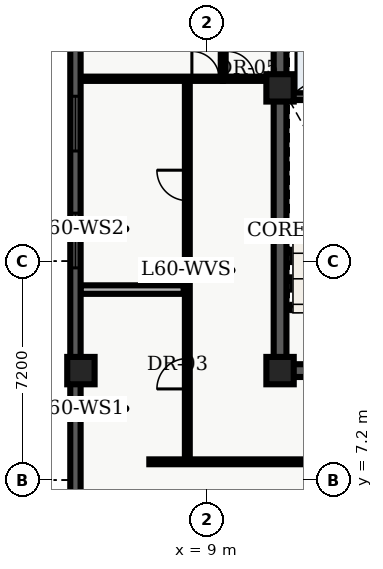
"""IFC4 building model, lengths in metres.
Left out: names, types, materials, properties, quantities, classifications, styles, units other than length and angle.
Written with IfcOpenShell. Run it as: python <this file> out.ifc"""

import sys

from ifc_helpers import new_model, entity, si_unit, converted_unit, direction, frame, origin_with_axes, origin_2d_with_axis, place, context, subcontext, project, spatial, polyline, rectangle, outline, extrude, element, fill, save


model = new_model("IFC4")
c1 = context("Model", 3, precision=1e-05, world=origin_with_axes(), true_north=direction((0.0, 1.0)))
c2 = subcontext(c1, "Body", "Model", "MODEL_VIEW")
j1 = project(units=[si_unit("LENGTHUNIT", "METRE"), converted_unit("PLANEANGLEUNIT", "DEGREE", entity("IfcPlaneAngleMeasure", 0.017), si_unit("PLANEANGLEUNIT", "RADIAN"), dimensions=[0, 0, 0, 0, 0, 0, 0])], contexts=[c1])
p1 = place(None, origin_with_axes())
s1 = spatial("IfcSite", under=j1, at=p1, CompositionType="ELEMENT")
p2 = place(p1, origin_with_axes())
s2 = spatial("IfcBuilding", under=s1, at=p2, CompositionType="ELEMENT")
p3 = place(p2, frame((0.0, 0.0, 244.2), z_axis=(0.0, 0.0, 1.0), x_axis=(1.0, 0.0, 0.0)))
s3 = spatial("IfcBuildingStorey", under=s2, at=p3, CompositionType="ELEMENT", Elevation=244.2)
p4 = place(p3, frame((11.4, 10.8, 0.0), z_axis=(0.0, 0.0, 1.0), x_axis=(0.0, 1.0, 0.0)))
e1 = element("IfcWall", 1, at=p4, inside=s3, PredefinedType="SHEAR", context=c2, shape_type="SweptSolid", body=[
    extrude(outline(polyline([(0.0, -0.21), (27.0, -0.21), (27.0, 0.21), (0.0, 0.21), (0.0, -0.21)])), origin_with_axes(), (0.0, 0.0, 1.0), 3.6),
])
p5 = place(p3, frame((11.4, 10.8, 0.0), z_axis=(0.0, 0.0, 1.0), x_axis=(1.0, 0.0, 0.0)))
e2 = element("IfcWall", 2, at=p5, inside=s3, PredefinedType="SHEAR", context=c2, shape_type="SweptSolid", body=[
    extrude(outline(polyline([(0.0, -0.21), (7.2, -0.21), (7.2, 0.21), (0.0, 0.21), (0.0, -0.21)])), origin_with_axes(), (0.0, 0.0, 1.0), 3.6),
])
p6 = place(p5, frame((2.625, 0.0, 0.0), z_axis=(0.0, 0.0, 1.0), x_axis=(1.0, 0.0, 0.0)))
e3 = element("IfcOpeningElement", 3, at=p6, cuts=e2, PredefinedType="OPENING", context=c2, shape_type="SweptSolid", body=[
    extrude(rectangle(XDim=1.05, YDim=0.44, at=origin_2d_with_axis()), origin_with_axes(), (0.0, 0.0, 1.0), 2.15),
])
p7 = place(p3, frame((11.61, 19.825, 0.0), z_axis=(0.0, 0.0, 1.0), x_axis=(1.0, 0.0, 0.0)))
e4 = element("IfcWall", 4, at=p7, inside=s3, PredefinedType="SHEAR", context=c2, shape_type="SweptSolid", body=[
    extrude(outline(polyline([(0.0, -0.125), (6.78, -0.125), (6.78, 0.125), (0.0, 0.125), (0.0, -0.125)])), origin_with_axes(), (0.0, 0.0, 1.0), 3.6),
])
for number, where, z_axis, x_axis in (
    (5, (11.4, 10.8, 0.0), (0.0, 0.0, 1.0), (1.0, 0.0, 0.0)),
    (6, (11.4, 20.1, 0.0), (0.0, 0.0, 1.0), (1.0, 0.0, 0.0)),
    (7, (4.85, 10.8, 0.0), (0.0, 0.0, 1.0), (1.0, 0.0, 0.0)),
):
    element("IfcColumn", number, at=place(p3, frame(where, z_axis=z_axis, x_axis=x_axis)), inside=s3, PredefinedType="COLUMN", context=c2, shape_type="SweptSolid", body=[
        extrude(rectangle(XDim=0.9, YDim=0.9, at=origin_2d_with_axis()), origin_with_axes(), (0.0, 0.0, 1.0), 3.9),
    ])
p8 = place(p3, frame((9.52, 20.4, 0.0), z_axis=(0.0, 0.0, 1.0), x_axis=(0.0, 1.0, 0.0)))
e8 = element("IfcWall", 8, at=p8, inside=s3, PredefinedType="PARTITIONING", context=c2, shape_type="SweptSolid", body=[
    extrude(outline(polyline([(0.0, -0.07), (4.0, -0.07), (4.0, 0.07), (0.0, 0.07), (0.0, -0.07)])), origin_with_axes(), (0.0, 0.0, 1.0), 2.64),
])
p9 = place(p3, frame((9.52, 20.4, 0.0), z_axis=(0.0, 0.0, 1.0), x_axis=(1.0, 0.0, 0.0)))
e9 = element("IfcWall", 9, at=p9, inside=s3, PredefinedType="PARTITIONING", context=c2, shape_type="SweptSolid", body=[
    extrude(outline(polyline([(0.0, -0.07), (1.58, -0.07), (1.58, 0.07), (0.0, 0.07), (0.0, -0.07)])), origin_with_axes(), (0.0, 0.0, 1.0), 2.64),
])
p10 = place(p9, frame((0.59, 0.0, 0.0), z_axis=(0.0, 0.0, 1.0), x_axis=(1.0, 0.0, 0.0)))
e10 = element("IfcOpeningElement", 10, at=p10, cuts=e9, PredefinedType="OPENING", context=c2, shape_type="SweptSolid", body=[
    extrude(rectangle(XDim=0.9, YDim=0.16, at=origin_2d_with_axis()), origin_with_axes(), (0.0, 0.0, 1.0), 2.15),
])
p11 = place(p3, frame((7.1, 7.8, 0.0), z_axis=(0.0, 0.0, 1.0), x_axis=(1.0, 0.0, 0.0)))
e11 = element("IfcWall", 11, at=p11, inside=s3, PredefinedType="PARTITIONING", context=c2, shape_type="SweptSolid", body=[
    extrude(outline(polyline([(0.0, -0.08), (13.2, -0.08), (13.2, 0.08), (0.0, 0.08), (0.0, -0.08)])), origin_with_axes(), (0.0, 0.0, 1.0), 2.64),
])
p12 = place(p11, frame((6.57, 0.0, 0.0), z_axis=(0.0, 0.0, 1.0), x_axis=(1.0, 0.0, 0.0)))
e12 = element("IfcOpeningElement", 12, at=p12, cuts=e11, PredefinedType="OPENING", context=c2, shape_type="SweptSolid", body=[
    extrude(rectangle(XDim=1.2, YDim=0.18, at=origin_2d_with_axis()), origin_with_axes(), (0.0, 0.0, 1.0), 2.2),
])
p13 = place(p3, frame((8.35, 7.8, 0.0), z_axis=(0.0, 0.0, 1.0), x_axis=(0.0, 1.0, 0.0)))
e13 = element("IfcWall", 13, at=p13, inside=s3, PredefinedType="PARTITIONING", context=c2, shape_type="SweptSolid", body=[
    extrude(outline(polyline([(0.0, -0.08), (12.6, -0.08), (12.6, 0.08), (0.0, 0.08), (0.0, -0.08)])), origin_with_axes(), (0.0, 0.0, 1.0), 2.64),
])
p14 = place(p13, frame((2.897, 0.0, 0.0), z_axis=(0.0, 0.0, 1.0), x_axis=(1.0, 0.0, 0.0)))
e14 = element("IfcOpeningElement", 14, at=p14, cuts=e13, PredefinedType="OPENING", context=c2, shape_type="SweptSolid", body=[
    extrude(rectangle(XDim=1.0, YDim=0.18, at=origin_2d_with_axis()), origin_with_axes(), (0.0, 0.0, 1.0), 2.15),
])
p15 = place(p13, frame((9.092, 0.0, 0.0), z_axis=(0.0, 0.0, 1.0), x_axis=(1.0, 0.0, 0.0)))
e15 = element("IfcOpeningElement", 15, at=p15, cuts=e13, PredefinedType="OPENING", context=c2, shape_type="SweptSolid", body=[
    extrude(rectangle(XDim=1.0, YDim=0.18, at=origin_2d_with_axis()), origin_with_axes(), (0.0, 0.0, 1.0), 2.15),
])
p16 = place(p3, frame((4.835, 20.4, 0.0), z_axis=(0.0, 0.0, 1.0), x_axis=(1.0, 0.0, 0.0)))
e16 = element("IfcWall", 16, at=p16, inside=s3, PredefinedType="PARTITIONING", context=c2, shape_type="SweptSolid", body=[
    extrude(outline(polyline([(0.0, -0.07), (4.685, -0.07), (4.685, 0.07), (0.0, 0.07), (0.0, -0.07)])), origin_with_axes(), (0.0, 0.0, 1.0), 2.64),
])
p17 = place(p16, frame((4.115, 0.0, 0.0), z_axis=(0.0, 0.0, 1.0), x_axis=(1.0, 0.0, 0.0)))
e17 = element("IfcOpeningElement", 17, at=p17, cuts=e16, PredefinedType="OPENING", context=c2, shape_type="SweptSolid", body=[
    extrude(rectangle(XDim=0.9, YDim=0.16, at=origin_2d_with_axis()), origin_with_axes(), (0.0, 0.0, 1.0), 2.15),
])
p18 = place(p3, frame((4.835, 13.465, 0.0), z_axis=(0.0, 0.0, 1.0), x_axis=(1.0, 0.0, 0.0)))
e18 = element("IfcWall", 18, at=p18, inside=s3, PredefinedType="PARTITIONING", context=c2, shape_type="SweptSolid", body=[
    extrude(outline(polyline([(0.0, -0.14), (3.395, -0.14), (3.395, 0.14), (0.0, 0.14), (0.0, -0.14)])), origin_with_axes(), (0.0, 0.0, 1.0), 2.64),
])
p19 = place(p3, frame((4.67, 2.74, 0.0), z_axis=(0.0, 0.0, 1.0), x_axis=(0.0, 1.0, 0.0)))
e19 = element("IfcWall", 19, at=p19, inside=s3, PredefinedType="SOLIDWALL", context=c2, shape_type="SweptSolid", body=[
    extrude(outline(polyline([(0.0, -0.17), (43.46, -0.17), (43.46, 0.17), (0.0, 0.17), (0.0, -0.17)])), origin_with_axes(), (0.0, 0.0, 1.0), 3.6),
])
p20 = place(p19, frame((2.948, 0.0, 0.45), z_axis=(0.0, 0.0, 1.0), x_axis=(1.0, 0.0, 0.0)))
e20 = element("IfcOpeningElement", 20, at=p20, cuts=e19, PredefinedType="OPENING", context=c2, shape_type="SweptSolid", body=[
    extrude(rectangle(XDim=1.8, YDim=0.36, at=origin_2d_with_axis()), origin_with_axes(), (0.0, 0.0, 1.0), 2.1),
])
p21 = place(p19, frame((12.339, 0.0, 0.45), z_axis=(0.0, 0.0, 1.0), x_axis=(1.0, 0.0, 0.0)))
e21 = element("IfcOpeningElement", 21, at=p21, cuts=e19, PredefinedType="OPENING", context=c2, shape_type="SweptSolid", body=[
    extrude(rectangle(XDim=1.8, YDim=0.36, at=origin_2d_with_axis()), origin_with_axes(), (0.0, 0.0, 1.0), 2.1),
])
p22 = place(p19, frame((16.184, 0.0, 0.45), z_axis=(0.0, 0.0, 1.0), x_axis=(1.0, 0.0, 0.0)))
e22 = element("IfcOpeningElement", 22, at=p22, cuts=e19, PredefinedType="OPENING", context=c2, shape_type="SweptSolid", body=[
    extrude(rectangle(XDim=1.8, YDim=0.36, at=origin_2d_with_axis()), origin_with_axes(), (0.0, 0.0, 1.0), 2.1),
])
p23 = place(p19, frame((40.062, 0.0, 0.45), z_axis=(0.0, 0.0, 1.0), x_axis=(1.0, 0.0, 0.0)))
e23 = element("IfcOpeningElement", 23, at=p23, cuts=e19, PredefinedType="OPENING", context=c2, shape_type="SweptSolid", body=[
    extrude(rectangle(XDim=1.8, YDim=0.36, at=origin_2d_with_axis()), origin_with_axes(), (0.0, 0.0, 1.0), 2.1),
])
p24 = place(p9, frame((0.59, 0.0, 0.0), z_axis=(0.0, 0.0, 1.0), x_axis=(1.0, 0.0, 0.0)))
e24 = element("IfcDoor", 24, at=p24, inside=s3, OperationType="SINGLE_SWING_LEFT", PredefinedType="DOOR", context=c2, shape_type="SweptSolid", body=[
    extrude(rectangle(XDim=0.9, YDim=0.084, at=origin_2d_with_axis()), origin_with_axes(), (0.0, 0.0, 1.0), 2.15),
])
fill(e10, e24)
p25 = place(p16, frame((4.115, 0.0, 0.0), z_axis=(0.0, 0.0, 1.0), x_axis=(1.0, 0.0, 0.0)))
e25 = element("IfcDoor", 25, at=p25, inside=s3, OperationType="SINGLE_SWING_LEFT", PredefinedType="DOOR", context=c2, shape_type="SweptSolid", body=[
    extrude(rectangle(XDim=0.9, YDim=0.084, at=origin_2d_with_axis()), origin_with_axes(), (0.0, 0.0, 1.0), 2.15),
])
fill(e17, e25)
p26 = place(p13, frame((2.897, 0.0, 0.0), z_axis=(0.0, 0.0, 1.0), x_axis=(1.0, 0.0, 0.0)))
e26 = element("IfcDoor", 26, at=p26, inside=s3, OperationType="SINGLE_SWING_LEFT", PredefinedType="DOOR", context=c2, shape_type="SweptSolid", body=[
    extrude(rectangle(XDim=1.0, YDim=0.09, at=origin_2d_with_axis()), origin_with_axes(), (0.0, 0.0, 1.0), 2.15),
])
fill(e14, e26)
p27 = place(p13, frame((9.092, 0.0, 0.0), z_axis=(0.0, 0.0, 1.0), x_axis=(1.0, 0.0, 0.0)))
e27 = element("IfcDoor", 27, at=p27, inside=s3, OperationType="SINGLE_SWING_RIGHT", PredefinedType="DOOR", context=c2, shape_type="SweptSolid", body=[
    extrude(rectangle(XDim=1.0, YDim=0.09, at=origin_2d_with_axis()), origin_with_axes(), (0.0, 0.0, 1.0), 2.15),
])
fill(e15, e27)
p28 = place(p19, frame((12.339, 0.0, 0.45), z_axis=(0.0, 0.0, 1.0), x_axis=(1.0, 0.0, 0.0)))
e28 = element("IfcWindow", 28, at=p28, inside=s3, PredefinedType="WINDOW", context=c2, shape_type="SweptSolid", body=[
    extrude(rectangle(XDim=1.8, YDim=0.09, at=origin_2d_with_axis()), origin_with_axes(), (0.0, 0.0, 1.0), 2.1),
])
fill(e21, e28)
p29 = place(p19, frame((16.184, 0.0, 0.45), z_axis=(0.0, 0.0, 1.0), x_axis=(1.0, 0.0, 0.0)))
e29 = element("IfcWindow", 29, at=p29, inside=s3, PredefinedType="WINDOW", context=c2, shape_type="SweptSolid", body=[
    extrude(rectangle(XDim=1.8, YDim=0.09, at=origin_2d_with_axis()), origin_with_axes(), (0.0, 0.0, 1.0), 2.1),
])
fill(e22, e29)
save(model, sys.argv[1])
